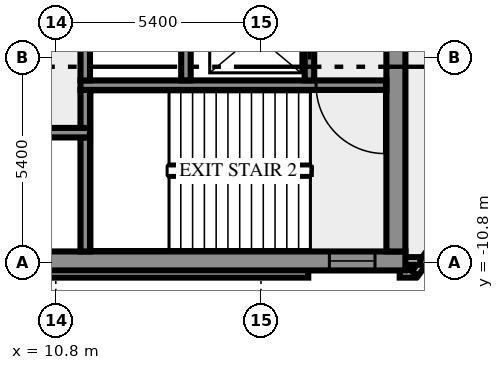
"""IFC4 building model, lengths in metres.
Left out: names, types, materials, properties, quantities, classifications, styles, units other than length and angle.
Written with IfcOpenShell. Run it as: python <this file> out.ifc"""

import sys

from ifc_helpers import new_model, si_unit, direction, frame, frame_2d, origin, place, context, subcontext, project, spatial, rectangle, extrude, element, fill, save


model = new_model("IFC4")
c1 = context("Model", 3, precision=1e-05, world=origin(), true_north=direction((0.0, 1.0)))
c2 = subcontext(c1, "Body", "Model", "MODEL_VIEW")
j1 = project(units=[si_unit("LENGTHUNIT", "METRE"), si_unit("PLANEANGLEUNIT", "RADIAN")], contexts=[c1])
p1 = place(None, origin())
s1 = spatial("IfcSite", under=j1, at=p1, CompositionType="ELEMENT")
p2 = place(p1, origin())
s2 = spatial("IfcBuilding", under=s1, at=p2, CompositionType="ELEMENT")
p3 = place(p2, frame((0.0, 0.0, 35.0)))
s3 = spatial("IfcBuildingStorey", under=s2, at=p3, CompositionType="ELEMENT", Elevation=35.0)
p4 = place(p3, frame((-17.444, -11.088, 0.0), z_axis=(0.0, 0.0, 1.0), x_axis=(1.0, 0.0, 0.0)))
e1 = element("IfcWall", 1, at=p4, inside=s3, PredefinedType="SOLIDWALL", context=c2, shape_type="SweptSolid", body=[
    extrude(rectangle(XDim=34.888, YDim=0.2, at=frame_2d((17.444, 0.0))), origin(), (0.0, 0.0, 1.0), 3.65),
])
p5 = place(p3, frame((19.85, -11.088, 0.0), z_axis=(0.0, 0.0, 1.0), x_axis=(1.0, 0.0, 0.0)))
e2 = element("IfcWall", 2, at=p5, inside=s3, PredefinedType="SOLIDWALL", context=c2, shape_type="SweptSolid", body=[
    extrude(rectangle(XDim=0.406, YDim=0.2, at=frame_2d((0.203, 0.0))), origin(), (0.0, 0.0, 1.0), 3.65),
])
p6 = place(p3, frame((20.253, -11.083, 0.0), z_axis=(0.0, 0.0, 1.0), x_axis=(0.587766567315, 0.809030569476, 0.0)))
e3 = element("IfcWall", 3, at=p6, inside=s3, PredefinedType="SOLIDWALL", context=c2, shape_type="SweptSolid", body=[
    extrude(rectangle(XDim=2.688, YDim=0.2, at=frame_2d((1.344, 0.0))), origin(), (0.0, 0.0, 1.0), 3.65),
])
p7 = place(p3, frame((19.98, -10.75, 0.0), z_axis=(0.0, 0.0, 1.0), x_axis=(1.0, 0.0, 0.0)))
e4 = element("IfcWall", 4, at=p7, inside=s3, PredefinedType="SOLIDWALL", context=c2, shape_type="SweptSolid", body=[
    extrude(rectangle(XDim=0.417, YDim=0.2, at=frame_2d((0.208, 0.0))), origin(), (0.0, 0.0, 1.0), 3.65),
])
p8 = place(p3, frame((-20.0, -10.75, 0.0), z_axis=(0.0, 0.0, 1.0), x_axis=(1.0, 0.0, 0.0)))
e5 = element("IfcWall", 5, at=p8, inside=s3, PredefinedType="SHEAR", context=c2, shape_type="SweptSolid", body=[
    extrude(rectangle(XDim=40.0, YDim=0.5, at=frame_2d((20.0, 0.0))), origin(), (0.0, 0.0, 1.0), 3.65),
])
p9 = place(p8, frame((0.8, 0.0, 1.0)))
e6 = element("IfcOpeningElement", 6, at=p9, cuts=e5, PredefinedType="OPENING", context=c2, shape_type="SweptSolid", body=[
    extrude(rectangle(XDim=1.2, YDim=1.2, at=frame_2d((0.6, 0.6))), frame((0.0, 0.26, 0.0), z_axis=(0.0, -1.0, 0.0), x_axis=(1.0, 0.0, 0.0)), (0.0, 0.0, 1.0), 0.52),
])
p10 = place(p8, frame((38.0, 0.0, 1.0)))
e7 = element("IfcOpeningElement", 7, at=p10, cuts=e5, PredefinedType="OPENING", context=c2, shape_type="SweptSolid", body=[
    extrude(rectangle(XDim=1.2, YDim=1.2, at=frame_2d((0.6, 0.6))), frame((0.0, 0.26, 0.0), z_axis=(0.0, -1.0, 0.0), x_axis=(1.0, 0.0, 0.0)), (0.0, 0.0, 1.0), 0.52),
])
p11 = place(p3, frame((11.575, -10.5, 0.0), z_axis=(0.0, 0.0, 1.0), x_axis=(0.0, 1.0, 0.0)))
e8 = element("IfcWall", 8, at=p11, inside=s3, PredefinedType="SHEAR", context=c2, shape_type="SweptSolid", body=[
    extrude(rectangle(XDim=3.0, YDim=0.25, at=frame_2d((1.5, 0.0))), origin(), (0.0, 0.0, 1.0), 3.65),
])
p12 = place(p3, frame((19.75, -10.5, 0.0), z_axis=(0.0, 0.0, 1.0), x_axis=(0.0, 1.0, 0.0)))
e9 = element("IfcWall", 9, at=p12, inside=s3, PredefinedType="SHEAR", context=c2, shape_type="SweptSolid", body=[
    extrude(rectangle(XDim=8.8, YDim=0.5, at=frame_2d((4.4, 0.0))), origin(), (0.0, 0.0, 1.0), 3.65),
])
p13 = place(p3, frame((11.7, -7.375, 0.0), z_axis=(0.0, 0.0, 1.0), x_axis=(-1.0, 0.0, 0.0)))
e10 = element("IfcWall", 10, at=p13, inside=s3, PredefinedType="SHEAR", context=c2, shape_type="SweptSolid", body=[
    extrude(rectangle(XDim=23.4, YDim=0.25, at=frame_2d((11.7, 0.0))), origin(), (0.0, 0.0, 1.0), 3.65),
])
p14 = place(p13, frame((21.45, 0.0, 0.0)))
e11 = element("IfcOpeningElement", 11, at=p14, cuts=e10, PredefinedType="OPENING", context=c2, shape_type="SweptSolid", body=[
    extrude(rectangle(XDim=1.1, YDim=2.1, at=frame_2d((0.55, 1.05))), frame((0.0, 0.135, 0.0), z_axis=(0.0, -1.0, 0.0), x_axis=(1.0, 0.0, 0.0)), (0.0, 0.0, 1.0), 0.27),
])
p15 = place(p13, frame((18.95, 0.0, 0.0)))
e12 = element("IfcOpeningElement", 12, at=p15, cuts=e10, PredefinedType="OPENING", context=c2, shape_type="SweptSolid", body=[
    extrude(rectangle(XDim=1.1, YDim=2.1, at=frame_2d((0.55, 1.05))), frame((0.0, 0.135, 0.0), z_axis=(0.0, -1.0, 0.0), x_axis=(1.0, 0.0, 0.0)), (0.0, 0.0, 1.0), 0.27),
])
p16 = place(p13, frame((16.45, 0.0, 0.0)))
e13 = element("IfcOpeningElement", 13, at=p16, cuts=e10, PredefinedType="OPENING", context=c2, shape_type="SweptSolid", body=[
    extrude(rectangle(XDim=1.1, YDim=2.1, at=frame_2d((0.55, 1.05))), frame((0.0, 0.135, 0.0), z_axis=(0.0, -1.0, 0.0), x_axis=(1.0, 0.0, 0.0)), (0.0, 0.0, 1.0), 0.27),
])
p17 = place(p13, frame((14.4, 0.0, 0.0)))
e14 = element("IfcOpeningElement", 14, at=p17, cuts=e10, PredefinedType="OPENING", context=c2, shape_type="SweptSolid", body=[
    extrude(rectangle(XDim=0.9, YDim=2.1, at=frame_2d((0.45, 1.05))), frame((0.0, 0.135, 0.0), z_axis=(0.0, -1.0, 0.0), x_axis=(1.0, 0.0, 0.0)), (0.0, 0.0, 1.0), 0.27),
])
p18 = place(p13, frame((12.5, 0.0, 0.0)))
e15 = element("IfcOpeningElement", 15, at=p18, cuts=e10, PredefinedType="OPENING", context=c2, shape_type="SweptSolid", body=[
    extrude(rectangle(XDim=0.9, YDim=2.1, at=frame_2d((0.45, 1.05))), frame((0.0, 0.135, 0.0), z_axis=(0.0, -1.0, 0.0), x_axis=(1.0, 0.0, 0.0)), (0.0, 0.0, 1.0), 0.27),
])
p19 = place(p13, frame((10.6, 0.0, 0.0)))
e16 = element("IfcOpeningElement", 16, at=p19, cuts=e10, PredefinedType="OPENING", context=c2, shape_type="SweptSolid", body=[
    extrude(rectangle(XDim=0.9, YDim=2.1, at=frame_2d((0.45, 1.05))), frame((0.0, 0.135, 0.0), z_axis=(0.0, -1.0, 0.0), x_axis=(1.0, 0.0, 0.0)), (0.0, 0.0, 1.0), 0.27),
])
p20 = place(p3, frame((11.575, -7.25, 0.0), z_axis=(0.0, 0.0, 1.0), x_axis=(0.0, 1.0, 0.0)))
e17 = element("IfcWall", 17, at=p20, inside=s3, PredefinedType="SHEAR", context=c2, shape_type="SweptSolid", body=[
    extrude(rectangle(XDim=1.0, YDim=0.25, at=frame_2d((0.5, 0.0))), origin(), (0.0, 0.0, 1.0), 3.65),
])
p21 = place(p3, frame((19.5, -6.125, 0.0), z_axis=(0.0, 0.0, 1.0), x_axis=(-1.0, 0.0, 0.0)))
e18 = element("IfcWall", 18, at=p21, inside=s3, PredefinedType="SHEAR", context=c2, shape_type="SweptSolid", body=[
    extrude(rectangle(XDim=8.05, YDim=0.25, at=frame_2d((4.025, 0.0))), origin(), (0.0, 0.0, 1.0), 3.65),
])
p22 = place(p21, frame((0.05, 0.0, 0.0)))
e19 = element("IfcOpeningElement", 19, at=p22, cuts=e18, PredefinedType="OPENING", context=c2, shape_type="SweptSolid", body=[
    extrude(rectangle(XDim=1.8, YDim=2.1, at=frame_2d((0.9, 1.05))), frame((0.0, 0.135, 0.0), z_axis=(0.0, -1.0, 0.0), x_axis=(1.0, 0.0, 0.0)), (0.0, 0.0, 1.0), 0.27),
])
for number, where, z_axis, x_axis in (
    (20, (11.575, -6.0, 0.0), (0.0, 0.0, 1.0), (0.0, 1.0, 0.0)),
    (21, (14.225, -6.0, 0.0), (0.0, 0.0, 1.0), (0.0, 1.0, 0.0)),
):
    element("IfcWall", number, at=place(p3, frame(where, z_axis=z_axis, x_axis=x_axis)), inside=s3, PredefinedType="SHEAR", context=c2, shape_type="SweptSolid", body=[
        extrude(rectangle(XDim=1.75, YDim=0.25, at=frame_2d((0.875, 0.0))), origin(), (0.0, 0.0, 1.0), 3.65),
    ])
p23 = place(p3, frame((17.475, -6.0, 0.0), z_axis=(0.0, 0.0, 1.0), x_axis=(0.0, 1.0, 0.0)))
e22 = element("IfcWall", 22, at=p23, inside=s3, PredefinedType="SHEAR", context=c2, shape_type="SweptSolid", body=[
    extrude(rectangle(XDim=4.3, YDim=0.25, at=frame_2d((2.15, 0.0))), origin(), (0.0, 0.0, 1.0), 3.65),
])
p24 = place(p23, frame((0.55, 0.0, 0.0)))
e23 = element("IfcOpeningElement", 23, at=p24, cuts=e22, PredefinedType="OPENING", context=c2, shape_type="SweptSolid", body=[
    extrude(rectangle(XDim=1.3, YDim=2.1, at=frame_2d((0.65, 1.05))), frame((0.0, 0.135, 0.0), z_axis=(0.0, -1.0, 0.0), x_axis=(1.0, 0.0, 0.0)), (0.0, 0.0, 1.0), 0.27),
])
p25 = place(p10, origin())
e24 = element("IfcWindow", 24, at=p25, inside=s3, PartitioningType="SINGLE_PANEL", PredefinedType="WINDOW", context=c2, shape_type="SweptSolid", body=[
    extrude(rectangle(XDim=1.2, YDim=1.2, at=frame_2d((0.6, 0.6))), frame((0.0, 0.03, 0.0), z_axis=(0.0, -1.0, 0.0), x_axis=(1.0, 0.0, 0.0)), (0.0, 0.0, 1.0), 0.06),
])
fill(e7, e24)
p26 = place(p22, origin())
e25 = element("IfcDoor", 25, at=p26, inside=s3, OperationType="DOUBLE_DOOR_SINGLE_SWING", PredefinedType="DOOR", context=c2, shape_type="SweptSolid", body=[
    extrude(rectangle(XDim=1.8, YDim=2.1, at=frame_2d((0.9, 1.05))), frame((0.0, 0.025, 0.0), z_axis=(0.0, -1.0, 0.0), x_axis=(1.0, 0.0, 0.0)), (0.0, 0.0, 1.0), 0.05),
])
fill(e19, e25)
p27 = place(p24, origin())
e26 = element("IfcDoor", 26, at=p27, inside=s3, OperationType="DOUBLE_DOOR_SLIDING", PredefinedType="DOOR", context=c2, shape_type="SweptSolid", body=[
    extrude(rectangle(XDim=1.3, YDim=2.1, at=frame_2d((0.65, 1.05))), frame((0.0, 0.025, 0.0), z_axis=(0.0, -1.0, 0.0), x_axis=(1.0, 0.0, 0.0)), (0.0, 0.0, 1.0), 0.05),
])
fill(e23, e26)
save(model, sys.argv[1])
